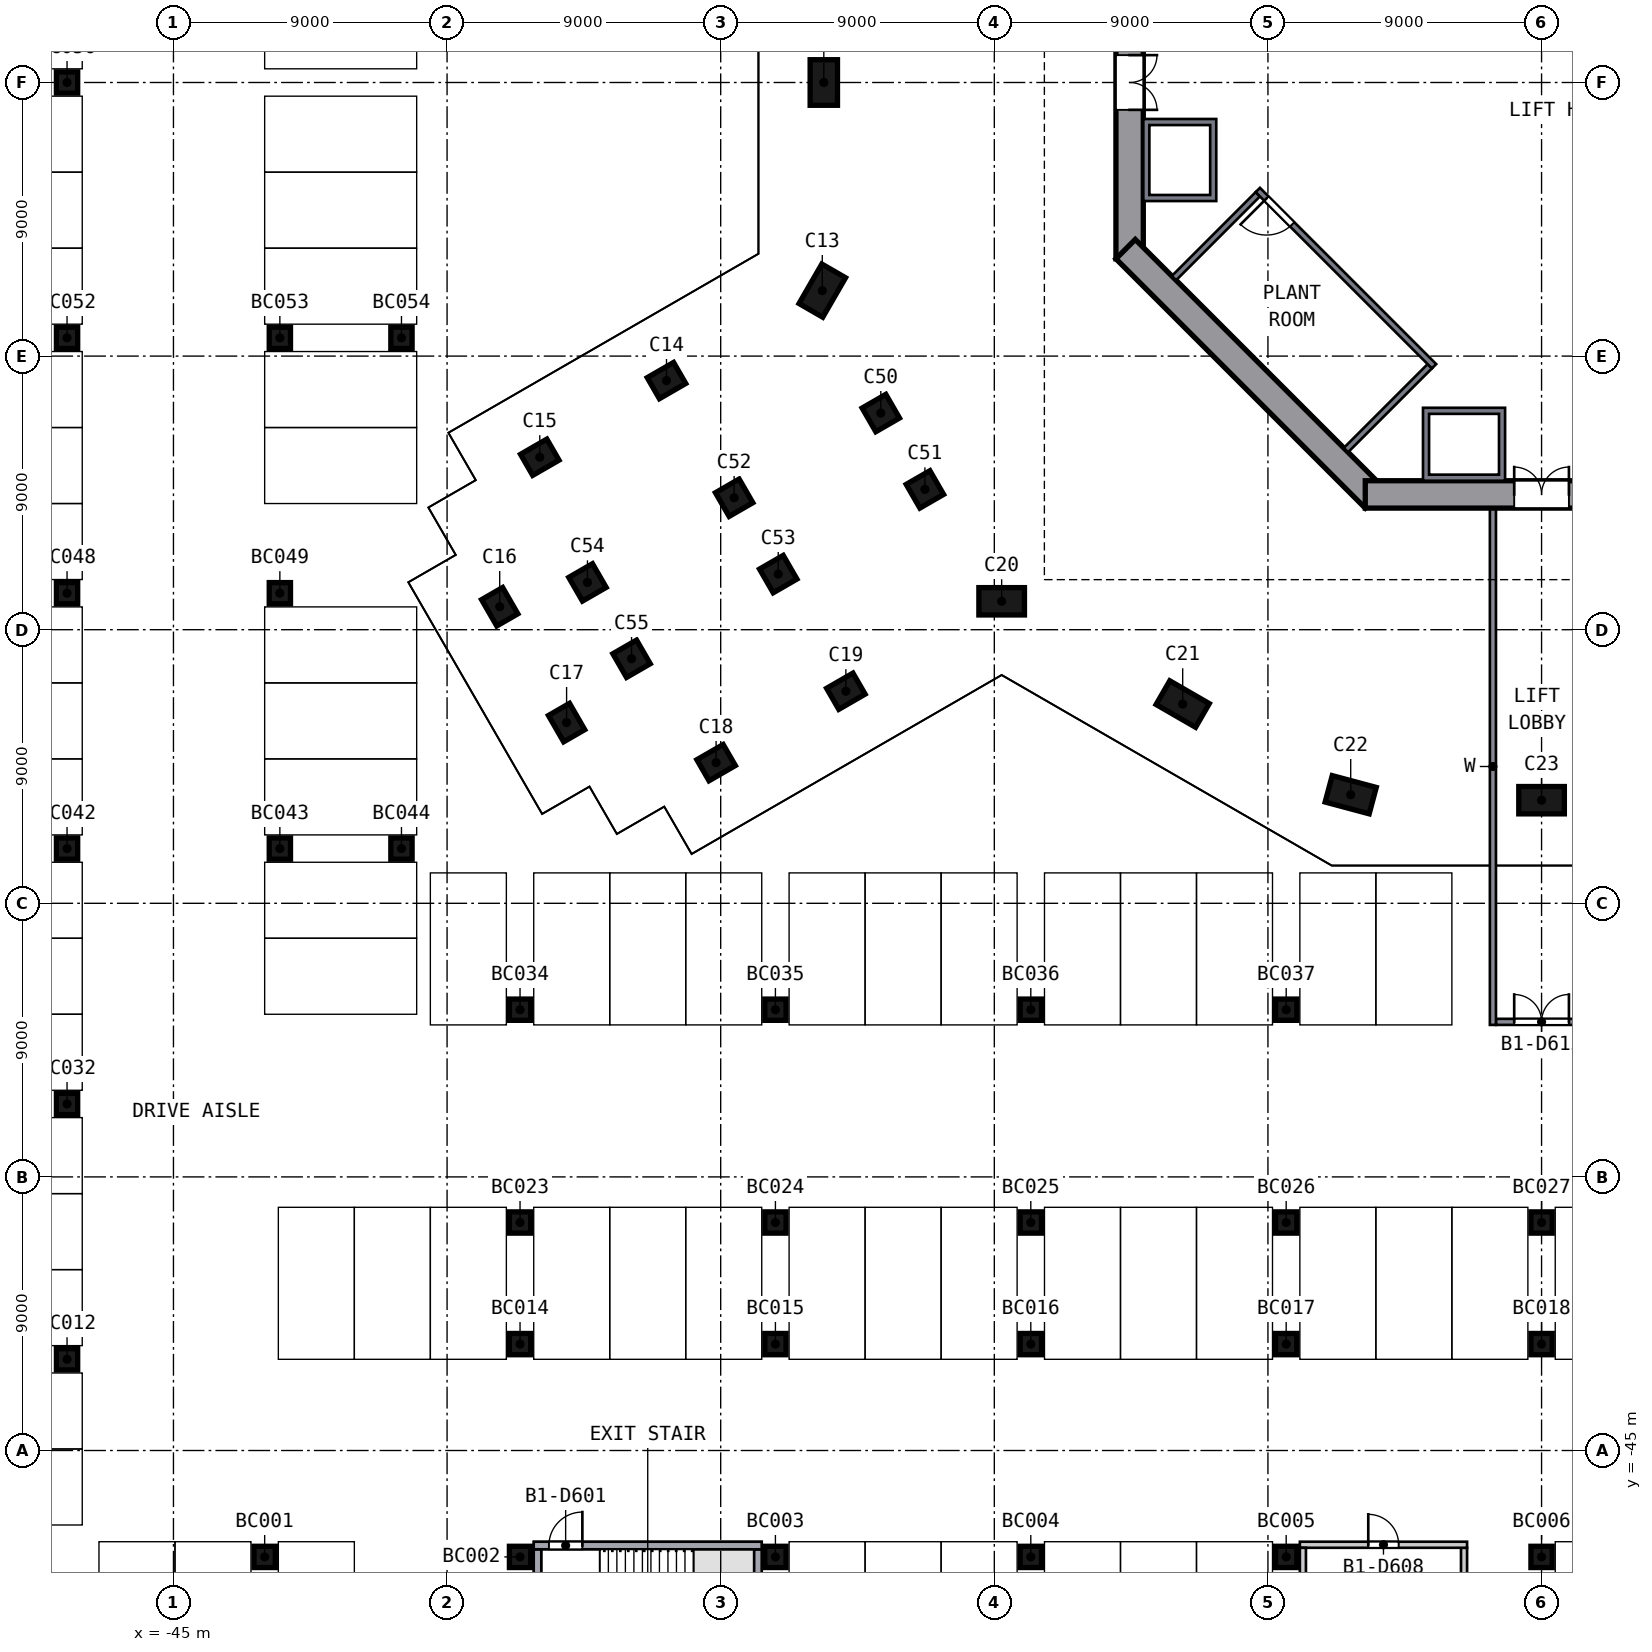
"""IFC4 building model, lengths in metres.
Left out: names, types, materials, properties, quantities, classifications, styles, units other than length and angle.
Written with IfcOpenShell. Run it as: python <this file> out.ifc"""

import sys

from ifc_helpers import new_model, si_unit, direction, frame, frame_2d, origin, origin_2d, place, context, subcontext, project, spatial, polyline, rectangle, outline, extrude, element, fill, save


model = new_model("IFC4")
c1 = context("Model", 3, precision=1e-05, world=origin(), true_north=direction((0.0, 1.0)))
c2 = subcontext(c1, "Body", "Model", "MODEL_VIEW")
j1 = project(units=[si_unit("LENGTHUNIT", "METRE"), si_unit("PLANEANGLEUNIT", "RADIAN")], contexts=[c1])
p1 = place(None, origin())
s1 = spatial("IfcSite", under=j1, at=p1, CompositionType="ELEMENT")
p2 = place(p1, origin())
s2 = spatial("IfcBuilding", under=s1, at=p2, CompositionType="ELEMENT")
p3 = place(p2, frame((0.0, 0.0, -3.9)))
s3 = spatial("IfcBuildingStorey", under=s2, at=p3, CompositionType="ELEMENT", Elevation=-3.9)
for number, where, z_axis, x_axis in (
    (1, (-23.608, 0.0, 0.0), (0.0, 0.0, 1.0), (0.0, -1.0, 0.0)),
    (2, (-23.658, -6.846, 0.0), (0.0, 0.0, 1.0), (0.5, 0.866, 0.0)),
):
    element("IfcColumn", number, at=place(p3, frame(where, z_axis=z_axis, x_axis=x_axis)), inside=s3, PredefinedType="COLUMN", context=c2, shape_type="SweptSolid", body=[
        extrude(rectangle(XDim=1.5, YDim=0.9, at=origin_2d()), origin(), (0.0, 0.0, 1.0), 3.45),
    ])
for number, where, z_axis, x_axis in (
    (3, (-28.783, -9.805, 0.0), (0.0, 0.0, 1.0), (-0.866, -0.5, 0.0)),
    (4, (-32.951, -12.327, 0.0), (0.0, 0.0, 1.0), (-0.866, -0.5, 0.0)),
    (5, (-34.269, -17.245, 0.0), (0.0, 0.0, 1.0), (0.5, -0.866, 0.0)),
    (6, (-32.069, -21.055, 0.0), (0.0, 0.0, 1.0), (0.5, -0.866, 0.0)),
    (7, (-27.151, -22.373, 0.0), (0.0, 0.0, 1.0), (0.866, 0.5, 0.0)),
    (8, (-22.883, -20.024, 0.0), (0.0, 0.0, 1.0), (0.866, 0.5, 0.0)),
):
    element("IfcColumn", number, at=place(p3, frame(where, z_axis=z_axis, x_axis=x_axis)), inside=s3, PredefinedType="COLUMN", context=c2, shape_type="SweptSolid", body=[
        extrude(rectangle(XDim=1.0, YDim=0.8, at=origin_2d()), origin(), (0.0, 0.0, 1.0), 3.45),
    ])
for number, where, z_axis, x_axis in (
    (9, (-17.758, -17.065, 0.0), (0.0, 0.0, 1.0), (-1.0, 0.0, 0.0)),
    (10, (-11.804, -20.445, 0.0), (0.0, 0.0, 1.0), (0.866, -0.5, 0.0)),
    (11, (-6.278, -23.428, 0.0), (0.0, 0.0, 1.0), (-0.966, 0.259, 0.0)),
    (12, (0.0, -23.608, 0.0), (0.0, 0.0, 1.0), (1.0, 0.0, 0.0)),
):
    element("IfcColumn", number, at=place(p3, frame(where, z_axis=z_axis, x_axis=x_axis)), inside=s3, PredefinedType="COLUMN", context=c2, shape_type="SweptSolid", body=[
        extrude(rectangle(XDim=1.5, YDim=0.9, at=origin_2d()), origin(), (0.0, 0.0, 1.0), 3.45),
    ])
for number, where, z_axis, x_axis in (
    (13, (-21.733, -10.873, 0.0), (0.0, 0.0, 1.0), (-0.866, -0.5, 0.0)),
    (14, (-20.283, -13.385, 0.0), (0.0, 0.0, 1.0), (-0.866, -0.5, 0.0)),
    (15, (-26.558, -13.659, 0.0), (0.0, 0.0, 1.0), (-0.866, -0.5, 0.0)),
    (16, (-25.108, -16.17, 0.0), (0.0, 0.0, 1.0), (-0.866, -0.5, 0.0)),
    (17, (-31.382, -16.444, 0.0), (0.0, 0.0, 1.0), (-0.866, -0.5, 0.0)),
    (18, (-29.932, -18.956, 0.0), (0.0, 0.0, 1.0), (-0.866, -0.5, 0.0)),
):
    element("IfcColumn", number, at=place(p3, frame(where, z_axis=z_axis, x_axis=x_axis)), inside=s3, PredefinedType="COLUMN", context=c2, shape_type="SweptSolid", body=[
        extrude(rectangle(XDim=0.9, YDim=0.9, at=origin_2d()), origin(), (0.0, 0.0, 1.0), 3.45),
    ])
p4 = place(p3, frame((-13.55, 5.799, 0.0), z_axis=(0.0, 0.0, 1.0), x_axis=(0.0, -1.0, 0.0)))
e19 = element("IfcWall", 19, at=p4, inside=s3, PredefinedType="SHEAR", context=c2, shape_type="SweptSolid", body=[
    extrude(rectangle(XDim=11.598, YDim=0.9, at=frame_2d((5.799, 0.0))), origin(), (0.0, 0.0, 1.0), 3.9),
])
p5 = place(p4, frame((4.899, 0.0, 0.0)))
e20 = element("IfcOpeningElement", 20, at=p5, cuts=e19, PredefinedType="OPENING", context=c2, shape_type="SweptSolid", body=[
    extrude(rectangle(XDim=1.8, YDim=2.1, at=frame_2d((0.9, 1.05))), frame((0.0, 0.46, 0.0), z_axis=(0.0, -1.0, 0.0), x_axis=(1.0, 0.0, 0.0)), (0.0, 0.0, 1.0), 0.92),
])
p6 = place(p3, frame((-13.682, -5.481, 0.0), z_axis=(0.0, 0.0, 1.0), x_axis=(0.707106781, -0.707106781, 0.0)))
e21 = element("IfcWall", 21, at=p6, inside=s3, PredefinedType="SHEAR", context=c2, shape_type="SweptSolid", body=[
    extrude(rectangle(XDim=11.598, YDim=0.9, at=frame_2d((5.799, 0.0))), origin(), (0.0, 0.0, 1.0), 3.9),
])
p7 = place(p3, frame((-5.799, -13.55, 0.0), z_axis=(0.0, 0.0, 1.0), x_axis=(1.0, 0.0, 0.0)))
e22 = element("IfcWall", 22, at=p7, inside=s3, PredefinedType="SHEAR", context=c2, shape_type="SweptSolid", body=[
    extrude(rectangle(XDim=11.598, YDim=0.9, at=frame_2d((5.799, 0.0))), origin(), (0.0, 0.0, 1.0), 3.9),
])
p8 = place(p7, frame((4.899, 0.0, 0.0)))
e23 = element("IfcOpeningElement", 23, at=p8, cuts=e22, PredefinedType="OPENING", context=c2, shape_type="SweptSolid", body=[
    extrude(rectangle(XDim=1.8, YDim=2.1, at=frame_2d((0.9, 1.05))), frame((0.0, 0.46, 0.0), z_axis=(0.0, -1.0, 0.0), x_axis=(1.0, 0.0, 0.0)), (0.0, 0.0, 1.0), 0.92),
])
for number, where, z_axis, x_axis in (
    (24, (-42.0, -48.5, 0.0), (0.0, 0.0, 1.0), (1.0, 0.0, 0.0)),
    (25, (-33.6, -48.5, 0.0), (0.0, 0.0, 1.0), (1.0, 0.0, 0.0)),
    (26, (-25.2, -48.5, 0.0), (0.0, 0.0, 1.0), (1.0, 0.0, 0.0)),
    (27, (-16.8, -48.5, 0.0), (0.0, 0.0, 1.0), (1.0, 0.0, 0.0)),
    (28, (-8.4, -48.5, 0.0), (0.0, 0.0, 1.0), (1.0, 0.0, 0.0)),
    (29, (0.0, -48.5, 0.0), (0.0, 0.0, 1.0), (1.0, 0.0, 0.0)),
    (30, (-48.5, -42.0, 0.0), (0.0, 0.0, 1.0), (1.0, 0.0, 0.0)),
    (31, (-33.6, -41.5, 0.0), (0.0, 0.0, 1.0), (1.0, 0.0, 0.0)),
    (32, (-25.2, -41.5, 0.0), (0.0, 0.0, 1.0), (1.0, 0.0, 0.0)),
    (33, (-16.8, -41.5, 0.0), (0.0, 0.0, 1.0), (1.0, 0.0, 0.0)),
    (34, (-8.4, -41.5, 0.0), (0.0, 0.0, 1.0), (1.0, 0.0, 0.0)),
    (35, (0.0, -41.5, 0.0), (0.0, 0.0, 1.0), (1.0, 0.0, 0.0)),
    (36, (-33.6, -37.5, 0.0), (0.0, 0.0, 1.0), (1.0, 0.0, 0.0)),
    (37, (-25.2, -37.5, 0.0), (0.0, 0.0, 1.0), (1.0, 0.0, 0.0)),
    (38, (-16.8, -37.5, 0.0), (0.0, 0.0, 1.0), (1.0, 0.0, 0.0)),
    (39, (-8.4, -37.5, 0.0), (0.0, 0.0, 1.0), (1.0, 0.0, 0.0)),
    (40, (0.0, -37.5, 0.0), (0.0, 0.0, 1.0), (1.0, 0.0, 0.0)),
    (41, (-48.5, -33.6, 0.0), (0.0, 0.0, 1.0), (1.0, 0.0, 0.0)),
    (42, (-33.6, -30.5, 0.0), (0.0, 0.0, 1.0), (1.0, 0.0, 0.0)),
    (43, (-25.2, -30.5, 0.0), (0.0, 0.0, 1.0), (1.0, 0.0, 0.0)),
    (44, (-16.8, -30.5, 0.0), (0.0, 0.0, 1.0), (1.0, 0.0, 0.0)),
    (45, (-8.4, -30.5, 0.0), (0.0, 0.0, 1.0), (1.0, 0.0, 0.0)),
    (46, (-48.5, -25.2, 0.0), (0.0, 0.0, 1.0), (1.0, 0.0, 0.0)),
    (47, (-41.5, -25.2, 0.0), (0.0, 0.0, 1.0), (1.0, 0.0, 0.0)),
    (48, (-37.5, -25.2, 0.0), (0.0, 0.0, 1.0), (1.0, 0.0, 0.0)),
    (49, (-48.5, -16.8, 0.0), (0.0, 0.0, 1.0), (1.0, 0.0, 0.0)),
    (50, (-41.5, -16.8, 0.0), (0.0, 0.0, 1.0), (1.0, 0.0, 0.0)),
    (51, (-48.5, -8.4, 0.0), (0.0, 0.0, 1.0), (1.0, 0.0, 0.0)),
    (52, (-41.5, -8.4, 0.0), (0.0, 0.0, 1.0), (1.0, 0.0, 0.0)),
    (53, (-37.5, -8.4, 0.0), (0.0, 0.0, 1.0), (1.0, 0.0, 0.0)),
    (54, (-48.5, 0.0, 0.0), (0.0, 0.0, 1.0), (1.0, 0.0, 0.0)),
):
    element("IfcColumn", number, at=place(p3, frame(where, z_axis=z_axis, x_axis=x_axis)), inside=s3, PredefinedType="COLUMN", context=c2, shape_type="SweptSolid", body=[
        extrude(rectangle(XDim=0.7, YDim=0.7, at=origin_2d()), origin(), (0.0, 0.0, 1.0), 3.84),
    ])
p9 = place(p3, origin())
e55 = element("IfcWall", 55, at=p9, inside=s3, PredefinedType="SOLIDWALL", context=c2, shape_type="SweptSolid", body=[
    extrude(outline(polyline([(-10.7, -3.9), (-13.1, -3.9), (-13.1, -1.2), (-10.7, -1.2), (-10.7, -3.9)]), holes=[polyline([(-12.9, -1.4), (-12.9, -3.7), (-10.9, -3.7), (-10.9, -1.4), (-12.9, -1.4)])]), origin(), (0.0, 0.0, 1.0), 3.45),
])
p10 = place(p3, origin())
e56 = element("IfcWall", 56, at=p10, inside=s3, PredefinedType="SOLIDWALL", context=c2, shape_type="SweptSolid", body=[
    extrude(outline(polyline([(-1.2, -13.1), (-3.9, -13.1), (-3.9, -10.7), (-1.2, -10.7), (-1.2, -13.1)]), holes=[polyline([(-3.7, -10.9), (-3.7, -12.9), (-1.4, -12.9), (-1.4, -10.9), (-3.7, -10.9)])]), origin(), (0.0, 0.0, 1.0), 3.45),
])
p11 = place(p3, frame((-3.535, -9.334, 0.0), z_axis=(0.0, 0.0, 1.0), x_axis=(-0.707106781, 0.707106781, 0.0)))
e57 = element("IfcWall", 57, at=p11, inside=s3, PredefinedType="SOLIDWALL", context=c2, shape_type="SweptSolid", body=[
    extrude(rectangle(XDim=8.2, YDim=0.2, at=frame_2d((4.1, 0.0))), origin(), (0.0, 0.0, 1.0), 3.45),
])
p12 = place(p11, frame((6.6, 0.0, 0.0)))
e58 = element("IfcOpeningElement", 58, at=p12, cuts=e57, PredefinedType="OPENING", context=c2, shape_type="SweptSolid", body=[
    extrude(rectangle(XDim=1.2, YDim=2.1, at=frame_2d((0.6, 1.05))), frame((0.0, 0.11, 0.0), z_axis=(0.0, -1.0, 0.0), x_axis=(1.0, 0.0, 0.0)), (0.0, 0.0, 1.0), 0.22),
])
for number, where, z_axis, x_axis in (
    (59, (-9.334, -3.677, 0.0), (0.0, 0.0, 1.0), (-0.707, -0.707, 0.0)),
    (60, (-3.677, -9.334, 0.0), (0.0, 0.0, 1.0), (-0.707, -0.707, 0.0)),
):
    element("IfcWall", number, at=place(p3, frame(where, z_axis=z_axis, x_axis=x_axis)), inside=s3, PredefinedType="SOLIDWALL", context=c2, shape_type="SweptSolid", body=[
        extrude(rectangle(XDim=3.9, YDim=0.2, at=frame_2d((1.95, 0.0))), origin(), (0.0, 0.0, 1.0), 3.45),
    ])
p13 = place(p3, frame((-33.15, -48.125, 0.0), z_axis=(0.0, 0.0, 1.0), x_axis=(1.0, 0.0, 0.0)))
e61 = element("IfcWall", 61, at=p13, inside=s3, PredefinedType="SOLIDWALL", context=c2, shape_type="SweptSolid", body=[
    extrude(rectangle(XDim=7.5, YDim=0.25, at=frame_2d((3.75, 0.0))), origin(), (0.0, 0.0, 1.0), 3.9),
])
p14 = place(p13, frame((0.5, 0.0, 0.0)))
e62 = element("IfcOpeningElement", 62, at=p14, cuts=e61, PredefinedType="OPENING", context=c2, shape_type="SweptSolid", body=[
    extrude(rectangle(XDim=1.1, YDim=2.1, at=frame_2d((0.55, 1.05))), frame((0.0, 0.135, 0.0), z_axis=(0.0, -1.0, 0.0), x_axis=(1.0, 0.0, 0.0)), (0.0, 0.0, 1.0), 0.27),
])
for number, where, z_axis, x_axis in (
    (63, (-33.025, -52.2, 0.0), (0.0, 0.0, 1.0), (0.0, 1.0, 0.0)),
    (64, (-25.775, -52.2, 0.0), (0.0, 0.0, 1.0), (0.0, 1.0, 0.0)),
):
    element("IfcWall", number, at=place(p3, frame(where, z_axis=z_axis, x_axis=x_axis)), inside=s3, PredefinedType="SOLIDWALL", context=c2, shape_type="SweptSolid", body=[
        extrude(rectangle(XDim=3.95, YDim=0.25, at=frame_2d((1.975, 0.0))), origin(), (0.0, 0.0, 1.0), 3.9),
    ])
p15 = place(p3, frame((-7.95, -48.1, 0.0), z_axis=(0.0, 0.0, 1.0), x_axis=(1.0, 0.0, 0.0)))
e65 = element("IfcWall", 65, at=p15, inside=s3, PredefinedType="PARTITIONING", context=c2, shape_type="SweptSolid", body=[
    extrude(rectangle(XDim=5.5, YDim=0.2, at=frame_2d((2.75, 0.0))), origin(), (0.0, 0.0, 1.0), 3.3),
])
p16 = place(p15, frame((2.25, 0.0, 0.0)))
e66 = element("IfcOpeningElement", 66, at=p16, cuts=e65, PredefinedType="OPENING", context=c2, shape_type="SweptSolid", body=[
    extrude(rectangle(XDim=1.0, YDim=2.1, at=frame_2d((0.5, 1.05))), frame((0.0, 0.11, 0.0), z_axis=(0.0, -1.0, 0.0), x_axis=(1.0, 0.0, 0.0)), (0.0, 0.0, 1.0), 0.22),
])
for number, where, z_axis, x_axis in (
    (67, (-7.85, -51.4, 0.0), (0.0, 0.0, 1.0), (0.0, 1.0, 0.0)),
    (68, (-2.55, -51.4, 0.0), (0.0, 0.0, 1.0), (0.0, 1.0, 0.0)),
):
    element("IfcWall", number, at=place(p3, frame(where, z_axis=z_axis, x_axis=x_axis)), inside=s3, PredefinedType="PARTITIONING", context=c2, shape_type="SweptSolid", body=[
        extrude(rectangle(XDim=3.2, YDim=0.2, at=frame_2d((1.6, 0.0))), origin(), (0.0, 0.0, 1.0), 3.3),
    ])
p17 = place(p3, frame((-1.6, -31.0, 0.0), z_axis=(0.0, 0.0, 1.0), x_axis=(0.0, 1.0, 0.0)))
e69 = element("IfcWall", 69, at=p17, inside=s3, PredefinedType="PARTITIONING", context=c2, shape_type="SweptSolid", body=[
    extrude(rectangle(XDim=17.0, YDim=0.2, at=frame_2d((8.5, 0.0))), origin(), (0.0, 0.0, 1.0), 3.3),
])
p18 = place(p3, frame((-1.5, -30.9, 0.0), z_axis=(0.0, 0.0, 1.0), x_axis=(1.0, 0.0, 0.0)))
e70 = element("IfcWall", 70, at=p18, inside=s3, PredefinedType="PARTITIONING", context=c2, shape_type="SweptSolid", body=[
    extrude(rectangle(XDim=3.0, YDim=0.2, at=frame_2d((1.5, 0.0))), origin(), (0.0, 0.0, 1.0), 3.3),
])
p19 = place(p18, frame((0.6, 0.0, 0.0)))
e71 = element("IfcOpeningElement", 71, at=p19, cuts=e70, PredefinedType="OPENING", context=c2, shape_type="SweptSolid", body=[
    extrude(rectangle(XDim=1.8, YDim=2.1, at=frame_2d((0.9, 1.05))), frame((0.0, 0.11, 0.0), z_axis=(0.0, -1.0, 0.0), x_axis=(1.0, 0.0, 0.0)), (0.0, 0.0, 1.0), 0.22),
])
p20 = place(p12, origin())
e72 = element("IfcDoor", 72, at=p20, inside=s3, OperationType="SINGLE_SWING_RIGHT", PredefinedType="DOOR", context=c2, shape_type="SweptSolid", body=[
    extrude(rectangle(XDim=1.2, YDim=2.1, at=frame_2d((0.6, 1.05))), frame((0.0, 0.025, 0.0), z_axis=(0.0, -1.0, 0.0), x_axis=(1.0, 0.0, 0.0)), (0.0, 0.0, 1.0), 0.05),
])
fill(e58, e72)
p21 = place(p5, origin())
e73 = element("IfcDoor", 73, at=p21, inside=s3, OperationType="DOUBLE_DOOR_SINGLE_SWING", PredefinedType="DOOR", context=c2, shape_type="SweptSolid", body=[
    extrude(rectangle(XDim=1.8, YDim=2.1, at=frame_2d((0.9, 1.05))), frame((0.0, 0.025, 0.0), z_axis=(0.0, -1.0, 0.0), x_axis=(1.0, 0.0, 0.0)), (0.0, 0.0, 1.0), 0.05),
])
fill(e20, e73)
p22 = place(p8, origin())
e74 = element("IfcDoor", 74, at=p22, inside=s3, OperationType="DOUBLE_DOOR_SINGLE_SWING", PredefinedType="DOOR", context=c2, shape_type="SweptSolid", body=[
    extrude(rectangle(XDim=1.8, YDim=2.1, at=frame_2d((0.9, 1.05))), frame((0.0, 0.025, 0.0), z_axis=(0.0, -1.0, 0.0), x_axis=(1.0, 0.0, 0.0)), (0.0, 0.0, 1.0), 0.05),
])
fill(e23, e74)
p23 = place(p14, origin())
e75 = element("IfcDoor", 75, at=p23, inside=s3, OperationType="SINGLE_SWING_RIGHT", PredefinedType="DOOR", context=c2, shape_type="SweptSolid", body=[
    extrude(rectangle(XDim=1.1, YDim=2.1, at=frame_2d((0.55, 1.05))), frame((0.0, 0.025, 0.0), z_axis=(0.0, -1.0, 0.0), x_axis=(1.0, 0.0, 0.0)), (0.0, 0.0, 1.0), 0.05),
])
fill(e62, e75)
p24 = place(p16, origin())
e76 = element("IfcDoor", 76, at=p24, inside=s3, OperationType="SINGLE_SWING_LEFT", PredefinedType="DOOR", context=c2, shape_type="SweptSolid", body=[
    extrude(rectangle(XDim=1.0, YDim=2.1, at=frame_2d((0.5, 1.05))), frame((0.0, 0.025, 0.0), z_axis=(0.0, -1.0, 0.0), x_axis=(1.0, 0.0, 0.0)), (0.0, 0.0, 1.0), 0.05),
])
fill(e66, e76)
p25 = place(p19, origin())
e77 = element("IfcDoor", 77, at=p25, inside=s3, OperationType="DOUBLE_DOOR_SINGLE_SWING", PredefinedType="DOOR", context=c2, shape_type="SweptSolid", body=[
    extrude(rectangle(XDim=1.8, YDim=2.1, at=frame_2d((0.9, 1.05))), frame((0.0, 0.025, 0.0), z_axis=(0.0, -1.0, 0.0), x_axis=(1.0, 0.0, 0.0)), (0.0, 0.0, 1.0), 0.05),
])
fill(e71, e77)
save(model, sys.argv[1])
